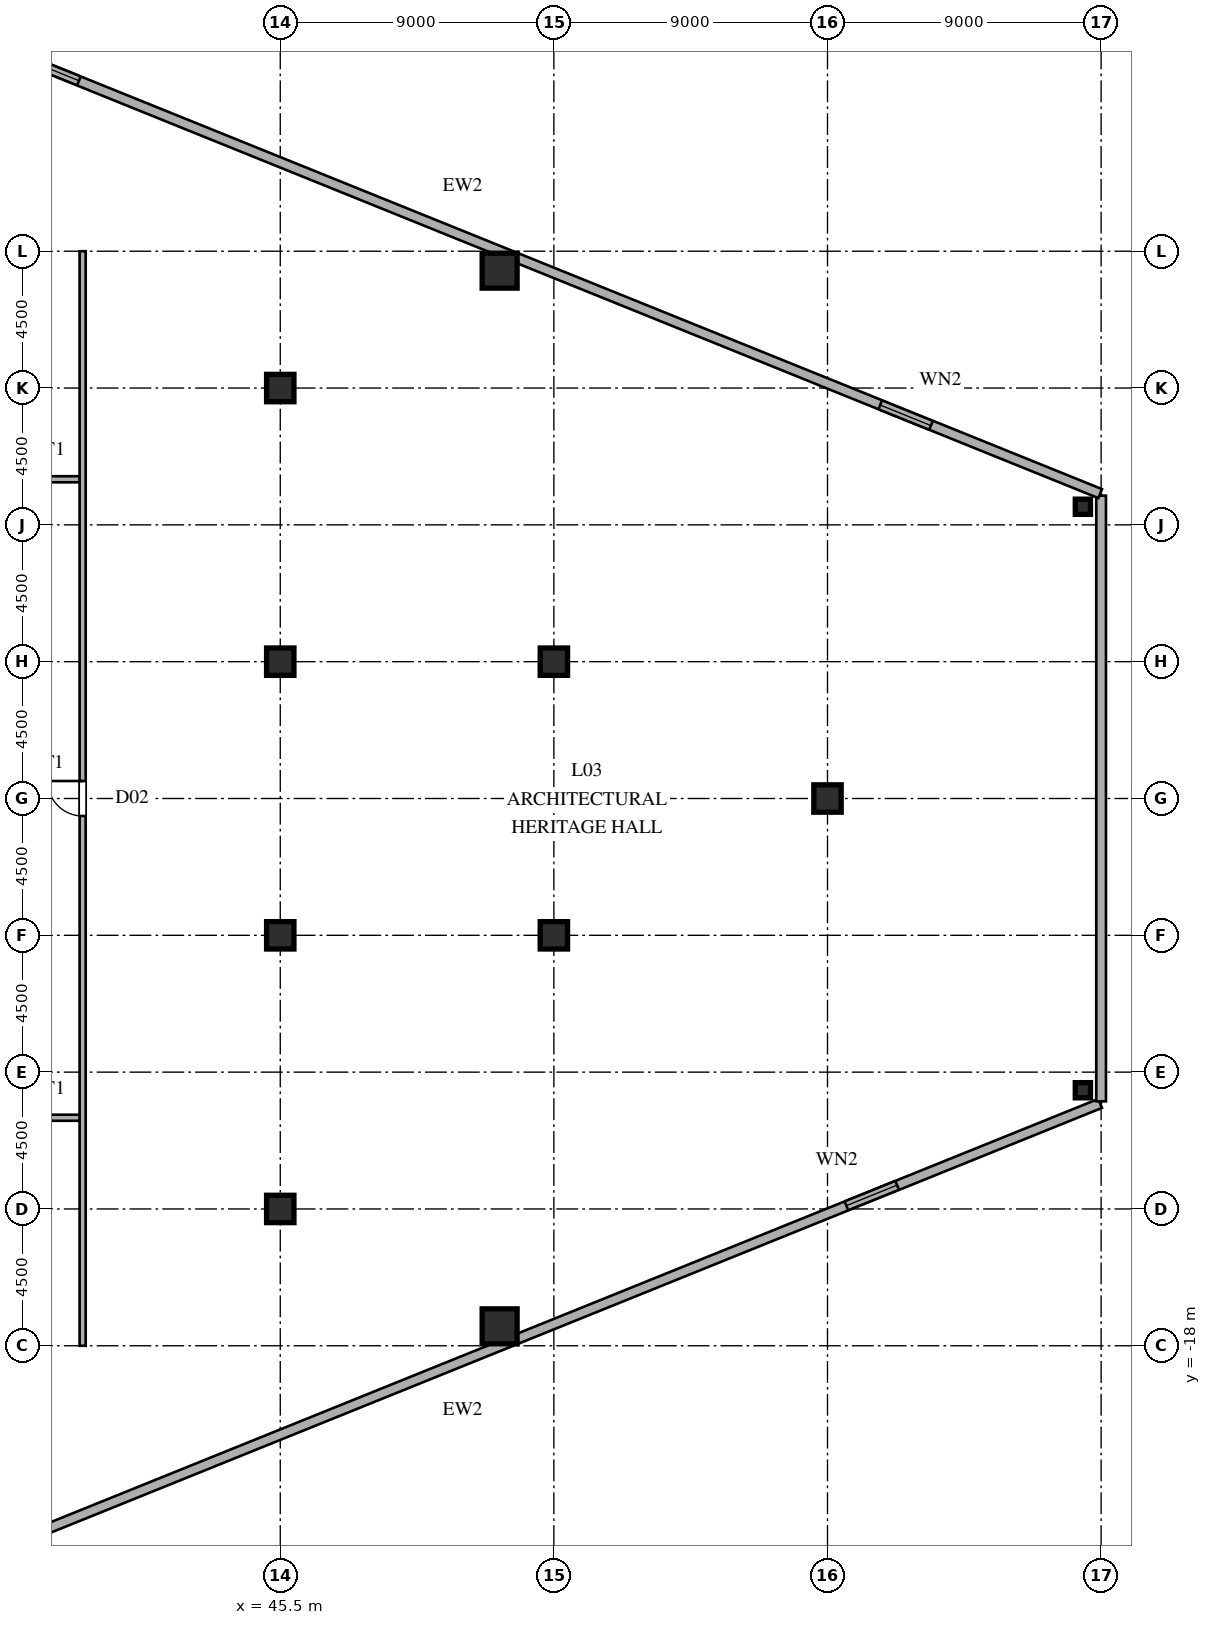
"""IFC4 building model, lengths in metres.
Left out: names, types, materials, properties, quantities, classifications, styles, units other than length and angle.
Written with IfcOpenShell. Run it as: python <this file> out.ifc"""

import sys

from ifc_helpers import new_model, si_unit, direction, frame, frame_2d, origin, origin_2d, place, context, subcontext, project, spatial, rectangle, hollow_rectangle, i_section, extrude, source, transform, mapped, element, fill, save


model = new_model("IFC4")
c1 = context("Model", 3, precision=1e-05, world=origin(), true_north=direction((0.0, 1.0)))
c2 = subcontext(c1, "Body", "Model", "MODEL_VIEW")
j1 = project(units=[si_unit("LENGTHUNIT", "METRE"), si_unit("PLANEANGLEUNIT", "RADIAN")], contexts=[c1])
p1 = place(None, origin())
s1 = spatial("IfcSite", under=j1, at=p1, CompositionType="ELEMENT")
p2 = place(p1, origin())
s2 = spatial("IfcBuilding", under=s1, at=p2, CompositionType="ELEMENT")
p3 = place(p2, frame((0.0, 0.0, 14.4)))
s3 = spatial("IfcBuildingStorey", under=s2, at=p3, CompositionType="ELEMENT", Elevation=14.4)
m1 = source(origin(), c2, "Body", "SweptSolid", [
    extrude(i_section(OverallWidth=0.9, OverallDepth=0.9, WebThickness=0.036, FlangeThickness=0.055, at=origin_2d()), origin(), (0.0, 0.0, 1.0), 4.5),
])
for number, where, z_axis, x_axis in (
    (1, (45.5, -13.5, 0.0), (0.0, 0.0, 1.0), (1.0, 0.0, 0.0)),
    (2, (45.5, -4.5, 0.0), (0.0, 0.0, 1.0), (1.0, 0.0, 0.0)),
    (3, (45.5, 4.5, 0.0), (0.0, 0.0, 1.0), (1.0, 0.0, 0.0)),
    (4, (45.5, 13.5, 0.0), (0.0, 0.0, 1.0), (1.0, 0.0, 0.0)),
    (5, (54.5, -4.5, 0.0), (0.0, 0.0, 1.0), (1.0, 0.0, 0.0)),
    (6, (54.5, 4.5, 0.0), (0.0, 0.0, 1.0), (1.0, 0.0, 0.0)),
    (7, (63.5, 0.0, 0.0), (0.0, 0.0, 1.0), (1.0, 0.0, 0.0)),
):
    element("IfcColumn", number, at=place(p3, frame(where, z_axis=z_axis, x_axis=x_axis)), inside=s3, PredefinedType="COLUMN", context=c2, shape_type="MappedRepresentation", body=[
        mapped(m1, transform((0.0, 0.0, 0.0), scale=1.0)),
    ])
m2 = source(origin(), c2, "Body", "SweptSolid", [
    extrude(hollow_rectangle(XDim=0.5, YDim=0.5, WallThickness=0.02, at=origin_2d()), origin(), (0.0, 0.0, 1.0), 4.5),
])
for number, where, z_axis, x_axis in (
    (8, (71.9, -9.596, 0.0), (0.0, 0.0, 1.0), (1.0, 0.0, 0.0)),
    (9, (71.9, 9.596, 0.0), (0.0, 0.0, 1.0), (1.0, 0.0, 0.0)),
):
    element("IfcColumn", number, at=place(p3, frame(where, z_axis=z_axis, x_axis=x_axis)), inside=s3, PredefinedType="COLUMN", context=c2, shape_type="MappedRepresentation", body=[
        mapped(m2, transform((0.0, 0.0, 0.0), scale=1.0)),
    ])
m3 = source(origin(), c2, "Body", "SweptSolid", [
    extrude(hollow_rectangle(XDim=1.15, YDim=1.15, WallThickness=0.048, at=origin_2d()), origin(), (0.0, 0.0, 1.0), 4.5),
])
for number, where, z_axis, x_axis in (
    (10, (52.716, -17.361, 0.0), (0.0, 0.0, 1.0), (1.0, 0.0, 0.0)),
    (11, (52.716, 17.361, 0.0), (0.0, 0.0, 1.0), (1.0, 0.0, 0.0)),
):
    element("IfcColumn", number, at=place(p3, frame(where, z_axis=z_axis, x_axis=x_axis)), inside=s3, PredefinedType="COLUMN", context=c2, shape_type="MappedRepresentation", body=[
        mapped(m3, transform((0.0, 0.0, 0.0), scale=1.0)),
    ])
p4 = place(p3, frame((30.537, -26.985, 0.0), z_axis=(0.0, 0.0, 1.0), x_axis=(0.926944846568, 0.375197616492, 0.0)))
e12 = element("IfcWall", 12, at=p4, inside=s3, PredefinedType="SOLIDWALL", context=c2, shape_type="SweptSolid", body=[
    extrude(rectangle(XDim=45.23, YDim=0.32, at=frame_2d((22.615, 0.0))), origin(), (0.0, 0.0, 1.0), 4.28),
])
p5 = place(p4, frame((6.0, 0.0, 0.85)))
e13 = element("IfcOpeningElement", 13, at=p5, cuts=e12, PredefinedType="OPENING", context=c2, shape_type="SweptSolid", body=[
    extrude(rectangle(XDim=1.8, YDim=2.0, at=frame_2d((0.9, 1.0))), frame((0.0, 0.17, 0.0), z_axis=(0.0, -1.0, 0.0), x_axis=(1.0, 0.0, 0.0)), (0.0, 0.0, 1.0), 0.34),
])
p6 = place(p4, frame((36.23, 0.0, 0.85)))
e14 = element("IfcOpeningElement", 14, at=p6, cuts=e12, PredefinedType="OPENING", context=c2, shape_type="SweptSolid", body=[
    extrude(rectangle(XDim=1.8, YDim=2.0, at=frame_2d((0.9, 1.0))), frame((0.0, 0.17, 0.0), z_axis=(0.0, -1.0, 0.0), x_axis=(1.0, 0.0, 0.0)), (0.0, 0.0, 1.0), 0.34),
])
p7 = place(p3, frame((72.5, -9.96, 0.0), z_axis=(0.0, 0.0, 1.0), x_axis=(0.0, 1.0, 0.0)))
e15 = element("IfcWall", 15, at=p7, inside=s3, PredefinedType="SOLIDWALL", context=c2, shape_type="SweptSolid", body=[
    extrude(rectangle(XDim=19.92, YDim=0.32, at=frame_2d((9.96, 0.0))), origin(), (0.0, 0.0, 1.0), 4.28),
])
p8 = place(p3, frame((72.463, 10.015, 0.0), z_axis=(0.0, 0.0, 1.0), x_axis=(-0.926944846568, 0.375197616492, 0.0)))
e16 = element("IfcWall", 16, at=p8, inside=s3, PredefinedType="SOLIDWALL", context=c2, shape_type="SweptSolid", body=[
    extrude(rectangle(XDim=45.23, YDim=0.32, at=frame_2d((22.615, 0.0))), origin(), (0.0, 0.0, 1.0), 4.28),
])
p9 = place(p8, frame((6.0, 0.0, 0.85)))
e17 = element("IfcOpeningElement", 17, at=p9, cuts=e16, PredefinedType="OPENING", context=c2, shape_type="SweptSolid", body=[
    extrude(rectangle(XDim=1.8, YDim=2.0, at=frame_2d((0.9, 1.0))), frame((0.0, 0.17, 0.0), z_axis=(0.0, -1.0, 0.0), x_axis=(1.0, 0.0, 0.0)), (0.0, 0.0, 1.0), 0.34),
])
p10 = place(p8, frame((36.23, 0.0, 0.85)))
e18 = element("IfcOpeningElement", 18, at=p10, cuts=e16, PredefinedType="OPENING", context=c2, shape_type="SweptSolid", body=[
    extrude(rectangle(XDim=1.8, YDim=2.0, at=frame_2d((0.9, 1.0))), frame((0.0, 0.17, 0.0), z_axis=(0.0, -1.0, 0.0), x_axis=(1.0, 0.0, 0.0)), (0.0, 0.0, 1.0), 0.34),
])
for number, where, z_axis, x_axis in (
    (19, (36.88, -10.5, 0.0), (0.0, 0.0, 1.0), (1.0, 0.0, 0.0)),
    (20, (36.88, 10.5, 0.0), (0.0, 0.0, 1.0), (1.0, 0.0, 0.0)),
):
    element("IfcWall", number, at=place(p3, frame(where, z_axis=z_axis, x_axis=x_axis)), inside=s3, PredefinedType="PARTITIONING", context=c2, shape_type="SweptSolid", body=[
        extrude(rectangle(XDim=2.035, YDim=0.2, at=frame_2d((1.018, 0.0))), origin(), (0.0, 0.0, 1.0), 4.28),
    ])
p11 = place(p3, frame((39.0, -18.0, 0.0), z_axis=(0.0, 0.0, 1.0), x_axis=(0.0, 1.0, 0.0)))
e21 = element("IfcWall", 21, at=p11, inside=s3, PredefinedType="PARTITIONING", context=c2, shape_type="SweptSolid", body=[
    extrude(rectangle(XDim=36.0, YDim=0.2, at=frame_2d((18.0, 0.0))), origin(), (0.0, 0.0, 1.0), 4.28),
])
p12 = place(p11, frame((17.425, 0.0, 0.0)))
e22 = element("IfcOpeningElement", 22, at=p12, cuts=e21, PredefinedType="OPENING", context=c2, shape_type="SweptSolid", body=[
    extrude(rectangle(XDim=1.15, YDim=2.2, at=frame_2d((0.575, 1.1))), frame((0.0, 0.11, 0.0), z_axis=(0.0, -1.0, 0.0), x_axis=(1.0, 0.0, 0.0)), (0.0, 0.0, 1.0), 0.22),
])
m4 = source(origin(), c2, "Body", "SweptSolid", [
    extrude(rectangle(XDim=1.8, YDim=2.0, at=frame_2d((0.9, 1.0))), frame((0.0, 0.03, 0.0), z_axis=(0.0, -1.0, 0.0), x_axis=(1.0, 0.0, 0.0)), (0.0, 0.0, 1.0), 0.06),
])
p13 = place(p6, origin())
e23 = element("IfcWindow", 23, at=p13, inside=s3, PartitioningType="SINGLE_PANEL", PredefinedType="WINDOW", context=c2, shape_type="MappedRepresentation", body=[
    mapped(m4, transform((0.0, 0.0, 0.0), scale=1.0)),
])
fill(e14, e23)
p14 = place(p9, origin())
e24 = element("IfcWindow", 24, at=p14, inside=s3, PartitioningType="SINGLE_PANEL", PredefinedType="WINDOW", context=c2, shape_type="MappedRepresentation", body=[
    mapped(m4, transform((0.0, 0.0, 0.0), scale=1.0)),
])
fill(e17, e24)
p15 = place(p10, origin())
e25 = element("IfcWindow", 25, at=p15, inside=s3, PartitioningType="SINGLE_PANEL", PredefinedType="WINDOW", context=c2, shape_type="MappedRepresentation", body=[
    mapped(m4, transform((0.0, 0.0, 0.0), scale=1.0)),
])
fill(e18, e25)
m5 = source(origin(), c2, "Body", "SweptSolid", [
    extrude(rectangle(XDim=1.15, YDim=2.2, at=frame_2d((0.575, 1.1))), frame((0.0, 0.025, 0.0), z_axis=(0.0, -1.0, 0.0), x_axis=(1.0, 0.0, 0.0)), (0.0, 0.0, 1.0), 0.05),
])
p16 = place(p12, origin())
e26 = element("IfcDoor", 26, at=p16, inside=s3, OperationType="SINGLE_SWING_RIGHT", PredefinedType="DOOR", context=c2, shape_type="MappedRepresentation", body=[
    mapped(m5, transform((0.0, 0.0, 0.0), scale=1.0)),
])
fill(e22, e26)
save(model, sys.argv[1])
